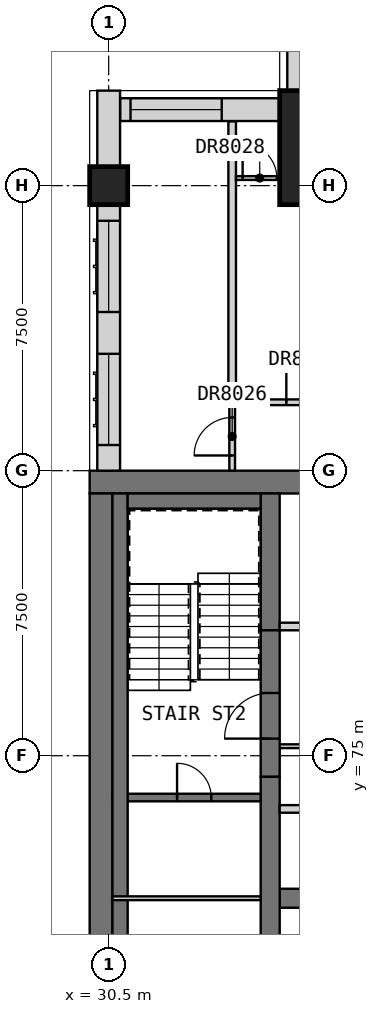
"""IFC4 building model, lengths in metres.
Left out: names, types, materials, properties, quantities, classifications, styles, units other than length and angle.
Written with IfcOpenShell. Run it as: python <this file> out.ifc"""

import sys

from ifc_helpers import new_model, si_unit, direction, frame, frame_2d, origin, origin_2d, place, context, subcontext, project, spatial, rectangle, extrude, element, fill, save


model = new_model("IFC4")
c1 = context("Model", 3, precision=1e-05, world=origin(), true_north=direction((0.0, 1.0)))
c2 = subcontext(c1, "Body", "Model", "MODEL_VIEW")
j1 = project(units=[si_unit("LENGTHUNIT", "METRE"), si_unit("PLANEANGLEUNIT", "RADIAN")], contexts=[c1])
p1 = place(None, origin())
s1 = spatial("IfcSite", under=j1, at=p1, CompositionType="ELEMENT")
p2 = place(p1, origin())
s2 = spatial("IfcBuilding", under=s1, at=p2, CompositionType="ELEMENT")
p3 = place(p2, frame((0.0, 0.0, 233.7)))
s3 = spatial("IfcBuildingStorey", under=s2, at=p3, CompositionType="ELEMENT", Elevation=233.7)
p4 = place(p3, frame((30.5, 90.0, 0.0), z_axis=(0.0, 0.0, 1.0), x_axis=(1.0, 0.0, 0.0)))
e1 = element("IfcColumn", 1, at=p4, inside=s3, PredefinedType="COLUMN", context=c2, shape_type="SweptSolid", body=[
    extrude(rectangle(XDim=1.0, YDim=1.0, at=origin_2d()), origin(), (0.0, 0.0, 1.0), 3.5),
])
p5 = place(p3, frame((36.5, 91.0, 0.0), z_axis=(0.0, 0.0, 1.0), x_axis=(1.0, 0.0, 0.0)))
e2 = element("IfcColumn", 2, at=p5, inside=s3, PredefinedType="COLUMN", context=c2, shape_type="SweptSolid", body=[
    extrude(rectangle(XDim=3.0, YDim=3.0, at=origin_2d()), origin(), (0.0, 0.0, 1.0), 3.5),
])
p6 = place(p3, frame((30.0, 82.2, 0.0), z_axis=(0.0, 0.0, 1.0), x_axis=(1.0, 0.0, 0.0)))
e3 = element("IfcWall", 3, at=p6, inside=s3, PredefinedType="SHEAR", context=c2, shape_type="SweptSolid", body=[
    extrude(rectangle(XDim=30.0, YDim=0.6, at=frame_2d((15.0, 0.0))), origin(), (0.0, 0.0, 1.0), 3.5),
])
p7 = place(p3, frame((30.3, 60.6, 0.0), z_axis=(0.0, 0.0, 1.0), x_axis=(0.0, 1.0, 0.0)))
e4 = element("IfcWall", 4, at=p7, inside=s3, PredefinedType="SHEAR", context=c2, shape_type="SweptSolid", body=[
    extrude(rectangle(XDim=21.3, YDim=0.6, at=frame_2d((10.65, 0.0))), origin(), (0.0, 0.0, 1.0), 3.5),
])
p8 = place(p3, frame((35.0, 71.25, 0.0), z_axis=(0.0, 0.0, 1.0), x_axis=(1.0, 0.0, 0.0)))
e5 = element("IfcWall", 5, at=p8, inside=s3, PredefinedType="SHEAR", context=c2, shape_type="SweptSolid", body=[
    extrude(rectangle(XDim=15.6, YDim=0.5, at=frame_2d((7.8, 0.0))), origin(), (0.0, 0.0, 1.0), 3.5),
])
p9 = place(p3, frame((34.75, 68.05, 0.0), z_axis=(0.0, 0.0, 1.0), x_axis=(0.0, 1.0, 0.0)))
e6 = element("IfcWall", 6, at=p9, inside=s3, PredefinedType="SHEAR", context=c2, shape_type="SweptSolid", body=[
    extrude(rectangle(XDim=6.4, YDim=0.5, at=frame_2d((3.2, 0.0))), origin(), (0.0, 0.0, 1.0), 3.5),
])
p10 = place(p3, frame((34.75, 78.3, 0.0), z_axis=(0.0, 0.0, 1.0), x_axis=(0.0, 1.0, 0.0)))
e7 = element("IfcWall", 7, at=p10, inside=s3, PredefinedType="SHEAR", context=c2, shape_type="SweptSolid", body=[
    extrude(rectangle(XDim=3.6, YDim=0.5, at=frame_2d((1.8, 0.0))), origin(), (0.0, 0.0, 1.0), 3.5),
])
p11 = place(p2, frame((0.0, 0.0, 34.0)))
s4 = spatial("IfcBuildingStorey", under=s2, at=p11, CompositionType="ELEMENT", Elevation=34.0)
for number, where, z_axis, x_axis in (
    (8, (29.7, 70.8, 0.0), (0.0, 0.0, 1.0), (0.0, 1.0, 0.0)),
    (9, (29.7, 75.675, 0.0), (0.0, 0.0, 1.0), (0.0, 1.0, 0.0)),
    (10, (29.7, 80.55, 0.0), (0.0, 0.0, 1.0), (0.0, 1.0, 0.0)),
):
    element("IfcWall", number, at=place(p11, frame(where, z_axis=z_axis, x_axis=x_axis)), inside=s4, PredefinedType="SOLIDWALL", context=c2, shape_type="SweptSolid", body=[
        extrude(rectangle(XDim=0.9, YDim=0.6, at=frame_2d((0.45, 0.0))), origin(), (0.0, 0.0, 1.0), 286.2),
    ])
p12 = place(p3, frame((35.5, 96.7, 0.0), z_axis=(0.0, 0.0, 1.0), x_axis=(0.0, -1.0, 0.0)))
e11 = element("IfcWall", 11, at=p12, inside=s3, PredefinedType="SOLIDWALL", context=c2, shape_type="SweptSolid", body=[
    extrude(rectangle(XDim=4.2, YDim=0.6, at=frame_2d((2.1, 0.0))), origin(), (0.0, 0.0, 1.0), 3.25),
])
p13 = place(p12, frame((0.275, 0.0, 0.8)))
e12 = element("IfcOpeningElement", 12, at=p13, cuts=e11, PredefinedType="OPENING", context=c2, shape_type="SweptSolid", body=[
    extrude(rectangle(XDim=2.4, YDim=1.8, at=frame_2d((1.2, 0.9))), frame((0.0, 0.31, 0.0), z_axis=(0.0, -1.0, 0.0), x_axis=(1.0, 0.0, 0.0)), (0.0, 0.0, 1.0), 0.62),
])
p14 = place(p3, frame((35.0, 92.0, 0.0), z_axis=(0.0, 0.0, 1.0), x_axis=(-1.0, 0.0, 0.0)))
e13 = element("IfcWall", 13, at=p14, inside=s3, PredefinedType="SOLIDWALL", context=c2, shape_type="SweptSolid", body=[
    extrude(rectangle(XDim=4.2, YDim=0.6, at=frame_2d((2.1, 0.0))), origin(), (0.0, 0.0, 1.0), 3.25),
])
p15 = place(p14, frame((1.525, 0.0, 0.8)))
e14 = element("IfcOpeningElement", 14, at=p15, cuts=e13, PredefinedType="OPENING", context=c2, shape_type="SweptSolid", body=[
    extrude(rectangle(XDim=2.4, YDim=1.8, at=frame_2d((1.2, 0.9))), frame((0.0, 0.31, 0.0), z_axis=(0.0, -1.0, 0.0), x_axis=(1.0, 0.0, 0.0)), (0.0, 0.0, 1.0), 0.62),
])
p16 = place(p3, frame((30.5, 92.5, 0.0), z_axis=(0.0, 0.0, 1.0), x_axis=(0.0, -1.0, 0.0)))
e15 = element("IfcWall", 15, at=p16, inside=s3, PredefinedType="SOLIDWALL", context=c2, shape_type="SweptSolid", body=[
    extrude(rectangle(XDim=2.0, YDim=0.6, at=frame_2d((1.0, 0.0))), origin(), (0.0, 0.0, 1.0), 3.25),
])
p17 = place(p3, frame((30.5, 89.5, 0.0), z_axis=(0.0, 0.0, 1.0), x_axis=(0.0, -1.0, 0.0)))
e16 = element("IfcWall", 16, at=p17, inside=s3, PredefinedType="SOLIDWALL", context=c2, shape_type="SweptSolid", body=[
    extrude(rectangle(XDim=7.0, YDim=0.6, at=frame_2d((3.5, 0.0))), origin(), (0.0, 0.0, 1.0), 3.25),
])
p18 = place(p17, frame((3.925, 0.0, 0.8)))
e17 = element("IfcOpeningElement", 17, at=p18, cuts=e16, PredefinedType="OPENING", context=c2, shape_type="SweptSolid", body=[
    extrude(rectangle(XDim=2.4, YDim=1.8, at=frame_2d((1.2, 0.9))), frame((0.0, 0.31, 0.0), z_axis=(0.0, -1.0, 0.0), x_axis=(1.0, 0.0, 0.0)), (0.0, 0.0, 1.0), 0.62),
])
p19 = place(p17, frame((0.425, 0.0, 0.8)))
e18 = element("IfcOpeningElement", 18, at=p19, cuts=e16, PredefinedType="OPENING", context=c2, shape_type="SweptSolid", body=[
    extrude(rectangle(XDim=2.4, YDim=1.8, at=frame_2d((1.2, 0.9))), frame((0.0, 0.31, 0.0), z_axis=(0.0, -1.0, 0.0), x_axis=(1.0, 0.0, 0.0)), (0.0, 0.0, 1.0), 0.62),
])
p20 = place(p3, frame((35.0, 73.6, 0.0), z_axis=(0.0, 0.0, 1.0), x_axis=(1.0, 0.0, 0.0)))
e19 = element("IfcWall", 19, at=p20, inside=s3, PredefinedType="SOLIDWALL", context=c2, shape_type="SweptSolid", body=[
    extrude(rectangle(XDim=15.6, YDim=0.2, at=frame_2d((7.8, 0.0))), origin(), (0.0, 0.0, 1.0), 3.5),
])
p21 = place(p20, frame((0.75, 0.0, 0.0)))
e20 = element("IfcOpeningElement", 20, at=p21, cuts=e19, PredefinedType="OPENING", context=c2, shape_type="SweptSolid", body=[
    extrude(rectangle(XDim=1.1, YDim=2.1, at=frame_2d((0.55, 1.05))), frame((0.0, 0.11, 0.0), z_axis=(0.0, -1.0, 0.0), x_axis=(1.0, 0.0, 0.0)), (0.0, 0.0, 1.0), 0.22),
])
p22 = place(p20, frame((3.35, 0.0, 0.0)))
e21 = element("IfcOpeningElement", 21, at=p22, cuts=e19, PredefinedType="OPENING", context=c2, shape_type="SweptSolid", body=[
    extrude(rectangle(XDim=1.1, YDim=2.1, at=frame_2d((0.55, 1.05))), frame((0.0, 0.11, 0.0), z_axis=(0.0, -1.0, 0.0), x_axis=(1.0, 0.0, 0.0)), (0.0, 0.0, 1.0), 0.22),
])
p23 = place(p20, frame((5.95, 0.0, 0.0)))
e22 = element("IfcOpeningElement", 22, at=p23, cuts=e19, PredefinedType="OPENING", context=c2, shape_type="SweptSolid", body=[
    extrude(rectangle(XDim=1.1, YDim=2.1, at=frame_2d((0.55, 1.05))), frame((0.0, 0.11, 0.0), z_axis=(0.0, -1.0, 0.0), x_axis=(1.0, 0.0, 0.0)), (0.0, 0.0, 1.0), 0.22),
])
p24 = place(p20, frame((8.55, 0.0, 0.0)))
e23 = element("IfcOpeningElement", 23, at=p24, cuts=e19, PredefinedType="OPENING", context=c2, shape_type="SweptSolid", body=[
    extrude(rectangle(XDim=1.1, YDim=2.1, at=frame_2d((0.55, 1.05))), frame((0.0, 0.11, 0.0), z_axis=(0.0, -1.0, 0.0), x_axis=(1.0, 0.0, 0.0)), (0.0, 0.0, 1.0), 0.22),
])
p25 = place(p20, frame((11.15, 0.0, 0.0)))
e24 = element("IfcOpeningElement", 24, at=p25, cuts=e19, PredefinedType="OPENING", context=c2, shape_type="SweptSolid", body=[
    extrude(rectangle(XDim=1.1, YDim=2.1, at=frame_2d((0.55, 1.05))), frame((0.0, 0.11, 0.0), z_axis=(0.0, -1.0, 0.0), x_axis=(1.0, 0.0, 0.0)), (0.0, 0.0, 1.0), 0.22),
])
p26 = place(p20, frame((13.75, 0.0, 0.0)))
e25 = element("IfcOpeningElement", 25, at=p26, cuts=e19, PredefinedType="OPENING", context=c2, shape_type="SweptSolid", body=[
    extrude(rectangle(XDim=1.1, YDim=2.1, at=frame_2d((0.55, 1.05))), frame((0.0, 0.11, 0.0), z_axis=(0.0, -1.0, 0.0), x_axis=(1.0, 0.0, 0.0)), (0.0, 0.0, 1.0), 0.22),
])
p27 = place(p3, frame((35.0, 78.4, 0.0), z_axis=(0.0, 0.0, 1.0), x_axis=(1.0, 0.0, 0.0)))
e26 = element("IfcWall", 26, at=p27, inside=s3, PredefinedType="SOLIDWALL", context=c2, shape_type="SweptSolid", body=[
    extrude(rectangle(XDim=15.6, YDim=0.2, at=frame_2d((7.8, 0.0))), origin(), (0.0, 0.0, 1.0), 3.5),
])
p28 = place(p27, frame((0.75, 0.0, 0.0)))
e27 = element("IfcOpeningElement", 27, at=p28, cuts=e26, PredefinedType="OPENING", context=c2, shape_type="SweptSolid", body=[
    extrude(rectangle(XDim=1.1, YDim=2.1, at=frame_2d((0.55, 1.05))), frame((0.0, 0.11, 0.0), z_axis=(0.0, -1.0, 0.0), x_axis=(1.0, 0.0, 0.0)), (0.0, 0.0, 1.0), 0.22),
])
p29 = place(p27, frame((3.35, 0.0, 0.0)))
e28 = element("IfcOpeningElement", 28, at=p29, cuts=e26, PredefinedType="OPENING", context=c2, shape_type="SweptSolid", body=[
    extrude(rectangle(XDim=1.1, YDim=2.1, at=frame_2d((0.55, 1.05))), frame((0.0, 0.11, 0.0), z_axis=(0.0, -1.0, 0.0), x_axis=(1.0, 0.0, 0.0)), (0.0, 0.0, 1.0), 0.22),
])
p30 = place(p27, frame((11.15, 0.0, 0.0)))
e29 = element("IfcOpeningElement", 29, at=p30, cuts=e26, PredefinedType="OPENING", context=c2, shape_type="SweptSolid", body=[
    extrude(rectangle(XDim=1.1, YDim=2.1, at=frame_2d((0.55, 1.05))), frame((0.0, 0.11, 0.0), z_axis=(0.0, -1.0, 0.0), x_axis=(1.0, 0.0, 0.0)), (0.0, 0.0, 1.0), 0.22),
])
p31 = place(p27, frame((13.75, 0.0, 0.0)))
e30 = element("IfcOpeningElement", 30, at=p31, cuts=e26, PredefinedType="OPENING", context=c2, shape_type="SweptSolid", body=[
    extrude(rectangle(XDim=1.1, YDim=2.1, at=frame_2d((0.55, 1.05))), frame((0.0, 0.11, 0.0), z_axis=(0.0, -1.0, 0.0), x_axis=(1.0, 0.0, 0.0)), (0.0, 0.0, 1.0), 0.22),
])
p32 = place(p3, frame((35.0, 75.25, 0.0), z_axis=(0.0, 0.0, 1.0), x_axis=(1.0, 0.0, 0.0)))
e31 = element("IfcWall", 31, at=p32, inside=s3, PredefinedType="PARTITIONING", context=c2, shape_type="SweptSolid", body=[
    extrude(rectangle(XDim=5.25, YDim=0.1, at=frame_2d((2.625, 0.0))), origin(), (0.0, 0.0, 1.0), 3.25),
])
p33 = place(p3, frame((34.75, 74.45, 0.0), z_axis=(0.0, 0.0, 1.0), x_axis=(0.0, 1.0, 0.0)))
e32 = element("IfcWall", 32, at=p33, inside=s3, PredefinedType="SOLIDWALL", context=c2, shape_type="SweptSolid", body=[
    extrude(rectangle(XDim=3.85, YDim=0.5, at=frame_2d((1.925, 0.0))), origin(), (0.0, 0.0, 1.0), 2.3),
])
p34 = place(p33, frame((1.0, 0.0, 0.0)))
e33 = element("IfcOpeningElement", 33, at=p34, cuts=e32, PredefinedType="OPENING", context=c2, shape_type="SweptSolid", body=[
    extrude(rectangle(XDim=1.2, YDim=2.1, at=frame_2d((0.6, 1.05))), frame((0.0, 0.26, 0.0), z_axis=(0.0, -1.0, 0.0), x_axis=(1.0, 0.0, 0.0)), (0.0, 0.0, 1.0), 0.52),
])
p35 = place(p3, frame((30.6, 73.9, 0.0), z_axis=(0.0, 0.0, 1.0), x_axis=(1.0, 0.0, 0.0)))
e34 = element("IfcWall", 34, at=p35, inside=s3, PredefinedType="SOLIDWALL", context=c2, shape_type="SweptSolid", body=[
    extrude(rectangle(XDim=3.9, YDim=0.2, at=frame_2d((1.95, 0.0))), origin(), (0.0, 0.0, 1.0), 3.25),
])
p36 = place(p35, frame((1.7, 0.0, 0.0)))
e35 = element("IfcOpeningElement", 35, at=p36, cuts=e34, PredefinedType="OPENING", context=c2, shape_type="SweptSolid", body=[
    extrude(rectangle(XDim=0.9, YDim=2.1, at=frame_2d((0.45, 1.05))), frame((0.0, 0.11, 0.0), z_axis=(0.0, -1.0, 0.0), x_axis=(1.0, 0.0, 0.0)), (0.0, 0.0, 1.0), 0.22),
])
p37 = place(p3, frame((30.8, 60.6, 0.0), z_axis=(0.0, 0.0, 1.0), x_axis=(0.0, 1.0, 0.0)))
e36 = element("IfcWall", 36, at=p37, inside=s3, PredefinedType="SOLIDWALL", context=c2, shape_type="SweptSolid", body=[
    extrude(rectangle(XDim=21.3, YDim=0.4, at=frame_2d((10.65, 0.0))), origin(), (0.0, 0.0, 1.0), 3.25),
])
p38 = place(p3, frame((31.0, 81.7, 0.0), z_axis=(0.0, 0.0, 1.0), x_axis=(1.0, 0.0, 0.0)))
e37 = element("IfcWall", 37, at=p38, inside=s3, PredefinedType="SOLIDWALL", context=c2, shape_type="SweptSolid", body=[
    extrude(rectangle(XDim=3.5, YDim=0.4, at=frame_2d((1.75, 0.0))), origin(), (0.0, 0.0, 1.0), 3.25),
])
p39 = place(p3, frame((30.6, 71.25, 0.0), z_axis=(0.0, 0.0, 1.0), x_axis=(1.0, 0.0, 0.0)))
e38 = element("IfcWall", 38, at=p39, inside=s3, PredefinedType="PARTITIONING", context=c2, shape_type="SweptSolid", body=[
    extrude(rectangle(XDim=3.9, YDim=0.1, at=frame_2d((1.95, 0.0))), origin(), (0.0, 0.0, 1.0), 3.25),
])
p40 = place(p3, frame((33.75, 84.3, 0.0), z_axis=(0.0, 0.0, 1.0), x_axis=(0.0, 1.0, 0.0)))
e39 = element("IfcWall", 39, at=p40, inside=s3, PredefinedType="PARTITIONING", context=c2, shape_type="SweptSolid", body=[
    extrude(rectangle(XDim=7.39, YDim=0.2, at=frame_2d((3.695, 0.0))), origin(), (0.0, 0.0, 1.0), 3.25),
])
p41 = place(p3, frame((33.85, 84.3, 0.0), z_axis=(0.0, 0.0, 1.0), x_axis=(1.0, 0.0, 0.0)))
e40 = element("IfcWall", 40, at=p41, inside=s3, PredefinedType="PARTITIONING", context=c2, shape_type="SweptSolid", body=[
    extrude(rectangle(XDim=27.95, YDim=0.15, at=frame_2d((13.975, 0.0))), origin(), (0.0, 0.0, 1.0), 3.25),
])
p42 = place(p41, frame((1.325, 0.0, 0.0)))
e41 = element("IfcOpeningElement", 41, at=p42, cuts=e40, PredefinedType="OPENING", context=c2, shape_type="SweptSolid", body=[
    extrude(rectangle(XDim=0.9, YDim=2.1, at=frame_2d((0.45, 1.05))), frame((0.0, 0.085, 0.0), z_axis=(0.0, -1.0, 0.0), x_axis=(1.0, 0.0, 0.0)), (0.0, 0.0, 1.0), 0.17),
])
p43 = place(p41, frame((8.825, 0.0, 0.0)))
e42 = element("IfcOpeningElement", 42, at=p43, cuts=e40, PredefinedType="OPENING", context=c2, shape_type="SweptSolid", body=[
    extrude(rectangle(XDim=0.9, YDim=2.1, at=frame_2d((0.45, 1.05))), frame((0.0, 0.085, 0.0), z_axis=(0.0, -1.0, 0.0), x_axis=(1.0, 0.0, 0.0)), (0.0, 0.0, 1.0), 0.17),
])
p44 = place(p41, frame((16.325, 0.0, 0.0)))
e43 = element("IfcOpeningElement", 43, at=p44, cuts=e40, PredefinedType="OPENING", context=c2, shape_type="SweptSolid", body=[
    extrude(rectangle(XDim=0.9, YDim=2.1, at=frame_2d((0.45, 1.05))), frame((0.0, 0.085, 0.0), z_axis=(0.0, -1.0, 0.0), x_axis=(1.0, 0.0, 0.0)), (0.0, 0.0, 1.0), 0.17),
])
p45 = place(p41, frame((26.55, 0.0, 0.0)))
e44 = element("IfcOpeningElement", 44, at=p45, cuts=e40, PredefinedType="OPENING", context=c2, shape_type="SweptSolid", body=[
    extrude(rectangle(XDim=1.0, YDim=2.1, at=frame_2d((0.5, 1.05))), frame((0.0, 0.085, 0.0), z_axis=(0.0, -1.0, 0.0), x_axis=(1.0, 0.0, 0.0)), (0.0, 0.0, 1.0), 0.17),
])
p46 = place(p3, frame((33.75, 82.5, 0.0), z_axis=(0.0, 0.0, 1.0), x_axis=(0.0, 1.0, 0.0)))
e45 = element("IfcWall", 45, at=p46, inside=s3, PredefinedType="PARTITIONING", context=c2, shape_type="SweptSolid", body=[
    extrude(rectangle(XDim=1.725, YDim=0.15, at=frame_2d((0.863, 0.0))), origin(), (0.0, 0.0, 1.0), 3.25),
])
p47 = place(p46, frame((0.4, 0.0, 0.0)))
e46 = element("IfcOpeningElement", 46, at=p47, cuts=e45, PredefinedType="OPENING", context=c2, shape_type="SweptSolid", body=[
    extrude(rectangle(XDim=1.0, YDim=2.1, at=frame_2d((0.5, 1.05))), frame((0.0, 0.085, 0.0), z_axis=(0.0, -1.0, 0.0), x_axis=(1.0, 0.0, 0.0)), (0.0, 0.0, 1.0), 0.17),
])
p48 = place(p3, frame((33.85, 90.2, 0.0), z_axis=(0.0, 0.0, 1.0), x_axis=(1.0, 0.0, 0.0)))
e47 = element("IfcWall", 47, at=p48, inside=s3, PredefinedType="PARTITIONING", context=c2, shape_type="SweptSolid", body=[
    extrude(rectangle(XDim=26.05, YDim=0.1, at=frame_2d((13.025, 0.0))), origin(), (0.0, 0.0, 1.0), 3.25),
])
p49 = place(p48, frame((0.175, 0.0, 0.0)))
e48 = element("IfcOpeningElement", 48, at=p49, cuts=e47, PredefinedType="OPENING", context=c2, shape_type="SweptSolid", body=[
    extrude(rectangle(XDim=0.9, YDim=2.1, at=frame_2d((0.45, 1.05))), frame((0.0, 0.06, 0.0), z_axis=(0.0, -1.0, 0.0), x_axis=(1.0, 0.0, 0.0)), (0.0, 0.0, 1.0), 0.12),
])
p50 = place(p48, frame((8.825, 0.0, 0.0)))
e49 = element("IfcOpeningElement", 49, at=p50, cuts=e47, PredefinedType="OPENING", context=c2, shape_type="SweptSolid", body=[
    extrude(rectangle(XDim=0.9, YDim=2.1, at=frame_2d((0.45, 1.05))), frame((0.0, 0.06, 0.0), z_axis=(0.0, -1.0, 0.0), x_axis=(1.0, 0.0, 0.0)), (0.0, 0.0, 1.0), 0.12),
])
p51 = place(p48, frame((16.325, 0.0, 0.0)))
e50 = element("IfcOpeningElement", 50, at=p51, cuts=e47, PredefinedType="OPENING", context=c2, shape_type="SweptSolid", body=[
    extrude(rectangle(XDim=0.9, YDim=2.1, at=frame_2d((0.45, 1.05))), frame((0.0, 0.06, 0.0), z_axis=(0.0, -1.0, 0.0), x_axis=(1.0, 0.0, 0.0)), (0.0, 0.0, 1.0), 0.12),
])
p52 = place(p48, frame((23.825, 0.0, 0.0)))
e51 = element("IfcOpeningElement", 51, at=p52, cuts=e47, PredefinedType="OPENING", context=c2, shape_type="SweptSolid", body=[
    extrude(rectangle(XDim=0.9, YDim=2.1, at=frame_2d((0.45, 1.05))), frame((0.0, 0.06, 0.0), z_axis=(0.0, -1.0, 0.0), x_axis=(1.0, 0.0, 0.0)), (0.0, 0.0, 1.0), 0.12),
])
p53 = place(p15, origin())
e52 = element("IfcWindow", 52, at=p53, inside=s3, PartitioningType="SINGLE_PANEL", PredefinedType="WINDOW", context=c2, shape_type="SweptSolid", body=[
    extrude(rectangle(XDim=2.4, YDim=1.8, at=frame_2d((1.2, 0.9))), frame((0.0, -0.07, 0.0), z_axis=(0.0, -1.0, 0.0), x_axis=(1.0, 0.0, 0.0)), (0.0, 0.0, 1.0), 0.06),
])
fill(e14, e52)
p54 = place(p18, origin())
e53 = element("IfcWindow", 53, at=p54, inside=s3, PartitioningType="SINGLE_PANEL", PredefinedType="WINDOW", context=c2, shape_type="SweptSolid", body=[
    extrude(rectangle(XDim=2.4, YDim=1.8, at=frame_2d((1.2, 0.9))), frame((0.0, -0.07, 0.0), z_axis=(0.0, -1.0, 0.0), x_axis=(1.0, 0.0, 0.0)), (0.0, 0.0, 1.0), 0.06),
])
fill(e17, e53)
p55 = place(p19, origin())
e54 = element("IfcWindow", 54, at=p55, inside=s3, PartitioningType="SINGLE_PANEL", PredefinedType="WINDOW", context=c2, shape_type="SweptSolid", body=[
    extrude(rectangle(XDim=2.4, YDim=1.8, at=frame_2d((1.2, 0.9))), frame((0.0, -0.07, 0.0), z_axis=(0.0, -1.0, 0.0), x_axis=(1.0, 0.0, 0.0)), (0.0, 0.0, 1.0), 0.06),
])
fill(e18, e54)
p56 = place(p34, origin())
e55 = element("IfcDoor", 55, at=p56, inside=s3, OperationType="SINGLE_SWING_RIGHT", PredefinedType="DOOR", context=c2, shape_type="SweptSolid", body=[
    extrude(rectangle(XDim=1.2, YDim=2.1, at=frame_2d((0.6, 1.05))), frame((0.0, 0.025, 0.0), z_axis=(0.0, -1.0, 0.0), x_axis=(1.0, 0.0, 0.0)), (0.0, 0.0, 1.0), 0.05),
])
fill(e33, e55)
p57 = place(p36, origin())
e56 = element("IfcDoor", 56, at=p57, inside=s3, OperationType="SINGLE_SWING_RIGHT", PredefinedType="DOOR", context=c2, shape_type="SweptSolid", body=[
    extrude(rectangle(XDim=0.9, YDim=2.1, at=frame_2d((0.45, 1.05))), frame((0.0, 0.025, 0.0), z_axis=(0.0, -1.0, 0.0), x_axis=(1.0, 0.0, 0.0)), (0.0, 0.0, 1.0), 0.05),
])
fill(e35, e56)
p58 = place(p47, origin())
e57 = element("IfcDoor", 57, at=p58, inside=s3, OperationType="SINGLE_SWING_LEFT", PredefinedType="DOOR", context=c2, shape_type="SweptSolid", body=[
    extrude(rectangle(XDim=1.0, YDim=2.1, at=frame_2d((0.5, 1.05))), frame((0.0, 0.025, 0.0), z_axis=(0.0, -1.0, 0.0), x_axis=(1.0, 0.0, 0.0)), (0.0, 0.0, 1.0), 0.05),
])
fill(e46, e57)
p59 = place(p42, origin())
e58 = element("IfcDoor", 58, at=p59, inside=s3, OperationType="SINGLE_SWING_LEFT", PredefinedType="DOOR", context=c2, shape_type="SweptSolid", body=[
    extrude(rectangle(XDim=0.9, YDim=2.1, at=frame_2d((0.45, 1.05))), frame((0.0, 0.025, 0.0), z_axis=(0.0, -1.0, 0.0), x_axis=(1.0, 0.0, 0.0)), (0.0, 0.0, 1.0), 0.05),
])
fill(e41, e58)
p60 = place(p49, origin())
e59 = element("IfcDoor", 59, at=p60, inside=s3, OperationType="SINGLE_SWING_RIGHT", PredefinedType="DOOR", context=c2, shape_type="SweptSolid", body=[
    extrude(rectangle(XDim=0.9, YDim=2.1, at=frame_2d((0.45, 1.05))), frame((0.0, 0.025, 0.0), z_axis=(0.0, -1.0, 0.0), x_axis=(1.0, 0.0, 0.0)), (0.0, 0.0, 1.0), 0.05),
])
fill(e48, e59)
save(model, sys.argv[1])
